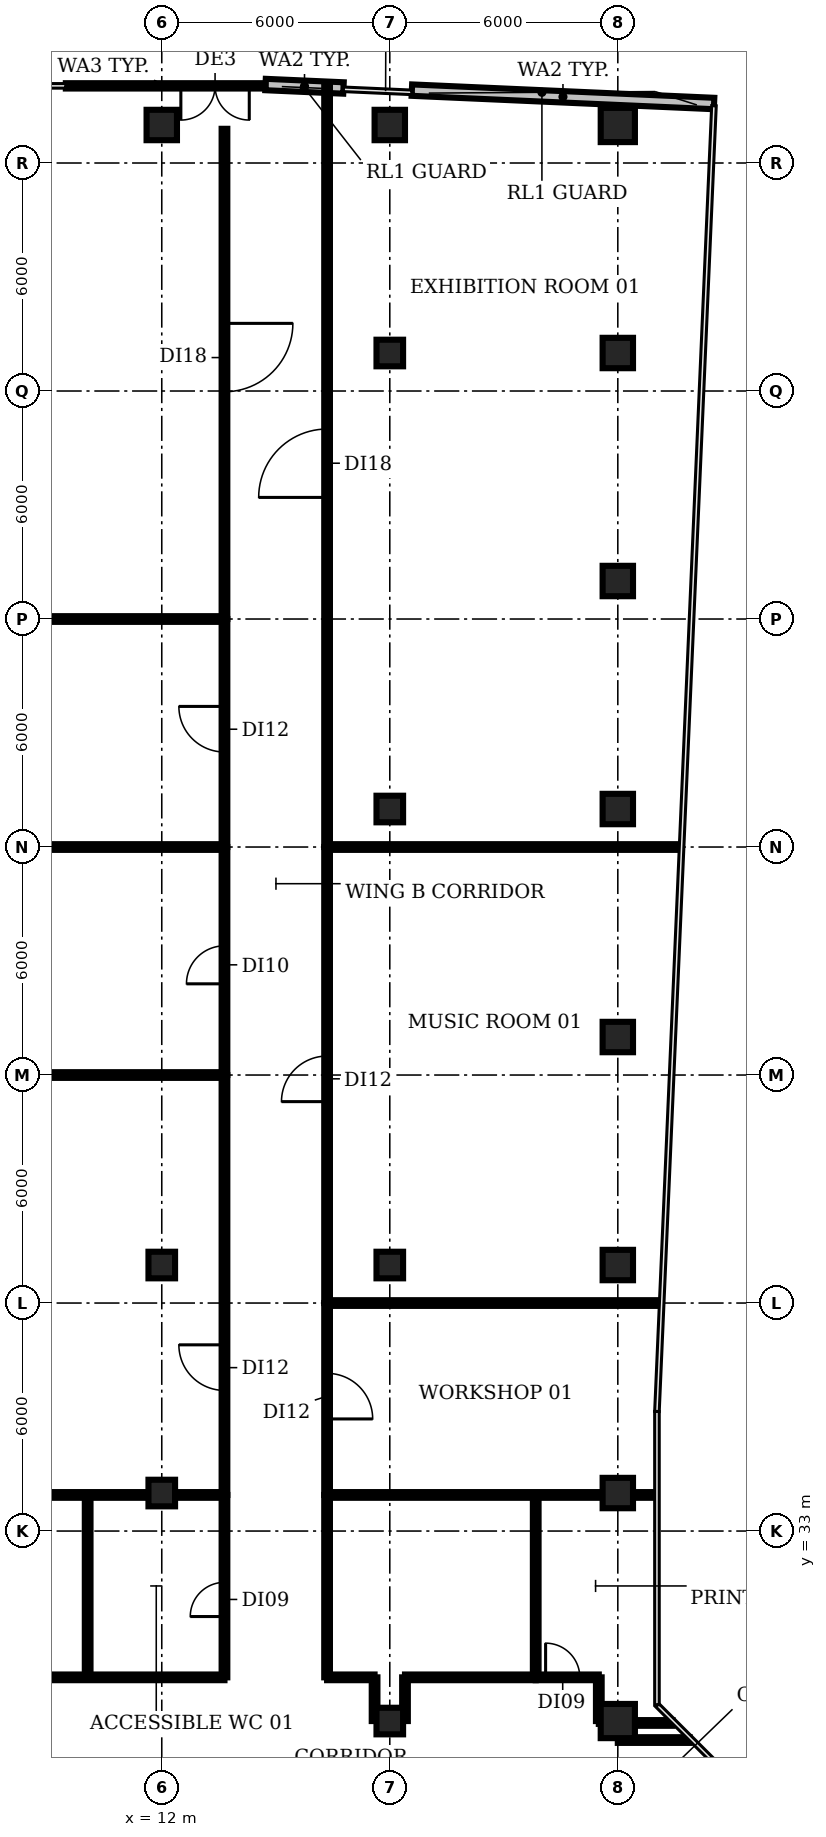
"""IFC4 building model, lengths in metres.
Left out: names, types, materials, properties, quantities, classifications, styles, units other than length and angle.
Written with IfcOpenShell. Run it as: python <this file> out.ifc"""

import sys

from ifc_helpers import new_model, si_unit, direction, frame, frame_2d, origin, origin_2d, place, context, subcontext, project, spatial, rectangle, circle, extrude, element, fill, save


model = new_model("IFC4")
c1 = context("Model", 3, precision=1e-05, world=origin(), true_north=direction((0.0, 1.0)))
c2 = subcontext(c1, "Body", "Model", "MODEL_VIEW")
j1 = project(units=[si_unit("LENGTHUNIT", "METRE"), si_unit("PLANEANGLEUNIT", "RADIAN")], contexts=[c1])
p1 = place(None, origin())
s1 = spatial("IfcSite", under=j1, at=p1, CompositionType="ELEMENT")
p2 = place(p1, origin())
s2 = spatial("IfcBuilding", under=s1, at=p2, CompositionType="ELEMENT")
p3 = place(p2, frame((0.0, 0.0, 239.0)))
s3 = spatial("IfcBuildingStorey", under=s2, at=p3, CompositionType="ELEMENT", Elevation=239.0)
for number, where, z_axis, x_axis in (
    (1, (12.0, 34.0, 0.0), (0.0, 0.0, 1.0), (1.0, 0.0, 0.0)),
    (2, (12.0, 40.0, 0.0), (0.0, 0.0, 1.0), (1.0, 0.0, 0.0)),
):
    element("IfcColumn", number, at=place(p3, frame(where, z_axis=z_axis, x_axis=x_axis)), inside=s3, PredefinedType="COLUMN", context=c2, shape_type="SweptSolid", body=[
        extrude(rectangle(XDim=0.7, YDim=0.7, at=origin_2d()), origin(), (0.0, 0.0, 1.0), 3.85),
    ])
p4 = place(p3, frame((12.0, 70.0, 0.0), z_axis=(0.0, 0.0, 1.0), x_axis=(1.0, 0.0, 0.0)))
e3 = element("IfcColumn", 3, at=p4, inside=s3, PredefinedType="COLUMN", context=c2, shape_type="SweptSolid", body=[
    extrude(rectangle(XDim=0.8, YDim=0.8, at=origin_2d()), origin(), (0.0, 0.0, 1.0), 3.85),
])
for number, where, z_axis, x_axis in (
    (4, (18.0, 28.0, 0.0), (0.0, 0.0, 1.0), (1.0, 0.0, 0.0)),
    (5, (18.0, 40.0, 0.0), (0.0, 0.0, 1.0), (1.0, 0.0, 0.0)),
    (6, (18.0, 52.0, 0.0), (0.0, 0.0, 1.0), (1.0, 0.0, 0.0)),
    (7, (18.0, 64.0, 0.0), (0.0, 0.0, 1.0), (1.0, 0.0, 0.0)),
):
    element("IfcColumn", number, at=place(p3, frame(where, z_axis=z_axis, x_axis=x_axis)), inside=s3, PredefinedType="COLUMN", context=c2, shape_type="SweptSolid", body=[
        extrude(rectangle(XDim=0.7, YDim=0.7, at=origin_2d()), origin(), (0.0, 0.0, 1.0), 3.85),
    ])
p5 = place(p3, frame((18.0, 70.0, 0.0), z_axis=(0.0, 0.0, 1.0), x_axis=(1.0, 0.0, 0.0)))
e8 = element("IfcColumn", 8, at=p5, inside=s3, PredefinedType="COLUMN", context=c2, shape_type="SweptSolid", body=[
    extrude(rectangle(XDim=0.8, YDim=0.8, at=origin_2d()), origin(), (0.0, 0.0, 1.0), 3.85),
])
p6 = place(p3, frame((24.0, 28.0, 0.0), z_axis=(0.0, 0.0, 1.0), x_axis=(1.0, 0.0, 0.0)))
e9 = element("IfcColumn", 9, at=p6, inside=s3, PredefinedType="COLUMN", context=c2, shape_type="SweptSolid", body=[
    extrude(circle(Radius=0.45, at=origin_2d()), origin(), (0.0, 0.0, 1.0), 3.85),
])
for number, where, z_axis, x_axis in (
    (10, (24.0, 34.0, 0.0), (0.0, 0.0, 1.0), (1.0, 0.0, 0.0)),
    (11, (24.0, 40.0, 0.0), (0.0, 0.0, 1.0), (1.0, 0.0, 0.0)),
    (12, (24.0, 46.0, 0.0), (0.0, 0.0, 1.0), (1.0, 0.0, 0.0)),
    (13, (24.0, 52.0, 0.0), (0.0, 0.0, 1.0), (1.0, 0.0, 0.0)),
    (14, (24.0, 58.0, 0.0), (0.0, 0.0, 1.0), (1.0, 0.0, 0.0)),
    (15, (24.0, 64.0, 0.0), (0.0, 0.0, 1.0), (1.0, 0.0, 0.0)),
):
    element("IfcColumn", number, at=place(p3, frame(where, z_axis=z_axis, x_axis=x_axis)), inside=s3, PredefinedType="COLUMN", context=c2, shape_type="SweptSolid", body=[
        extrude(rectangle(XDim=0.8, YDim=0.8, at=origin_2d()), origin(), (0.0, 0.0, 1.0), 3.85),
    ])
p7 = place(p3, frame((24.0, 70.0, 0.0), z_axis=(0.0, 0.0, 1.0), x_axis=(1.0, 0.0, 0.0)))
e16 = element("IfcColumn", 16, at=p7, inside=s3, PredefinedType="COLUMN", context=c2, shape_type="SweptSolid", body=[
    extrude(circle(Radius=0.45, at=origin_2d()), origin(), (0.0, 0.0, 1.0), 3.85),
])
p8 = place(p3, frame((26.533, 70.566, 0.0), z_axis=(0.0, 0.0, 1.0), x_axis=(-0.999020054915, 0.044259799799, 0.0)))
e17 = element("IfcWall", 17, at=p8, inside=s3, PredefinedType="SOLIDWALL", context=c2, shape_type="SweptSolid", body=[
    extrude(rectangle(XDim=7.96, YDim=0.3, at=frame_2d((3.98, 0.0))), origin(), (0.0, 0.0, 1.0), 3.85),
])
p9 = place(p3, frame((16.782, 70.974, 0.0), z_axis=(0.0, 0.0, 1.0), x_axis=(-0.999021293224, 0.044231840167, 0.0)))
e18 = element("IfcWall", 18, at=p9, inside=s3, PredefinedType="SOLIDWALL", context=c2, shape_type="SweptSolid", body=[
    extrude(rectangle(XDim=2.053, YDim=0.3, at=frame_2d((1.027, 0.0))), origin(), (0.0, 0.0, 1.0), 3.85),
])
p10 = place(p3, frame((14.729, 71.03, 0.0), z_axis=(0.0, 0.0, 1.0), x_axis=(-1.0, 0.0, 0.0)))
e19 = element("IfcWall", 19, at=p10, inside=s3, PredefinedType="SOLIDWALL", context=c2, shape_type="SweptSolid", body=[
    extrude(rectangle(XDim=5.253, YDim=0.14, at=frame_2d((2.626, 0.0))), origin(), (0.0, 0.0, 1.0), 3.85),
])
p11 = place(p10, frame((0.427, 0.0, 0.0)))
e20 = element("IfcOpeningElement", 20, at=p11, cuts=e19, PredefinedType="OPENING", context=c2, shape_type="SweptSolid", body=[
    extrude(rectangle(XDim=1.8, YDim=2.4, at=frame_2d((0.9, 1.2))), frame((0.0, 0.08, 0.0), z_axis=(0.0, -1.0, 0.0), x_axis=(1.0, 0.0, 0.0)), (0.0, 0.0, 1.0), 0.16),
])
p12 = place(p3, frame((-1.1, 33.95, 0.0), z_axis=(0.0, 0.0, 1.0), x_axis=(1.0, 0.0, 0.0)))
e21 = element("IfcWall", 21, at=p12, inside=s3, PredefinedType="PARTITIONING", context=c2, shape_type="SweptSolid", body=[
    extrude(rectangle(XDim=14.75, YDim=0.15, at=frame_2d((7.375, 0.0))), origin(), (0.0, 0.0, 1.0), 2.88),
])
for number, where, z_axis, x_axis in (
    (22, (-0.98, 45.0, 0.0), (0.0, 0.0, 1.0), (1.0, 0.0, 0.0)),
    (23, (-0.98, 51.0, 0.0), (0.0, 0.0, 1.0), (1.0, 0.0, 0.0)),
    (24, (-0.98, 57.0, 0.0), (0.0, 0.0, 1.0), (1.0, 0.0, 0.0)),
):
    element("IfcWall", number, at=place(p3, frame(where, z_axis=z_axis, x_axis=x_axis)), inside=s3, PredefinedType="PARTITIONING", context=c2, shape_type="SweptSolid", body=[
        extrude(rectangle(XDim=14.63, YDim=0.15, at=frame_2d((7.315, 0.0))), origin(), (0.0, 0.0, 1.0), 2.88),
    ])
p13 = place(p3, frame((6.4, 29.15, 0.0), z_axis=(0.0, 0.0, 1.0), x_axis=(1.0, 0.0, 0.0)))
e25 = element("IfcWall", 25, at=p13, inside=s3, PredefinedType="PARTITIONING", context=c2, shape_type="SweptSolid", body=[
    extrude(rectangle(XDim=7.25, YDim=0.15, at=frame_2d((3.625, 0.0))), origin(), (0.0, 0.0, 1.0), 2.88),
])
p14 = place(p3, frame((10.05, 29.15, 0.0), z_axis=(0.0, 0.0, 1.0), x_axis=(0.0, 1.0, 0.0)))
e26 = element("IfcWall", 26, at=p14, inside=s3, PredefinedType="PARTITIONING", context=c2, shape_type="SweptSolid", body=[
    extrude(rectangle(XDim=4.8, YDim=0.15, at=frame_2d((2.4, 0.0))), origin(), (0.0, 0.0, 1.0), 2.88),
])
p15 = place(p3, frame((13.65, 29.15, 0.0), z_axis=(0.0, 0.0, 1.0), x_axis=(0.0, 1.0, 0.0)))
e27 = element("IfcWall", 27, at=p15, inside=s3, PredefinedType="PARTITIONING", context=c2, shape_type="SweptSolid", body=[
    extrude(rectangle(XDim=4.8, YDim=0.15, at=frame_2d((2.4, 0.0))), origin(), (0.0, 0.0, 1.0), 2.88),
])
p16 = place(p15, frame((1.6, 0.0, 0.0)))
e28 = element("IfcOpeningElement", 28, at=p16, cuts=e27, PredefinedType="OPENING", context=c2, shape_type="SweptSolid", body=[
    extrude(rectangle(XDim=0.9, YDim=2.1, at=frame_2d((0.45, 1.05))), frame((0.0, 0.085, 0.0), z_axis=(0.0, -1.0, 0.0), x_axis=(1.0, 0.0, 0.0)), (0.0, 0.0, 1.0), 0.17),
])
p17 = place(p3, frame((13.65, 33.95, 0.0), z_axis=(0.0, 0.0, 1.0), x_axis=(0.0, 1.0, 0.0)))
e29 = element("IfcWall", 29, at=p17, inside=s3, PredefinedType="PARTITIONING", context=c2, shape_type="SweptSolid", body=[
    extrude(rectangle(XDim=11.05, YDim=0.15, at=frame_2d((5.525, 0.0))), origin(), (0.0, 0.0, 1.0), 2.88),
])
p18 = place(p17, frame((2.75, 0.0, 0.0)))
e30 = element("IfcOpeningElement", 30, at=p18, cuts=e29, PredefinedType="OPENING", context=c2, shape_type="SweptSolid", body=[
    extrude(rectangle(XDim=1.2, YDim=2.1, at=frame_2d((0.6, 1.05))), frame((0.0, 0.085, 0.0), z_axis=(0.0, -1.0, 0.0), x_axis=(1.0, 0.0, 0.0)), (0.0, 0.0, 1.0), 0.17),
])
p19 = place(p3, frame((13.65, 45.0, 0.0), z_axis=(0.0, 0.0, 1.0), x_axis=(0.0, 1.0, 0.0)))
e31 = element("IfcWall", 31, at=p19, inside=s3, PredefinedType="PARTITIONING", context=c2, shape_type="SweptSolid", body=[
    extrude(rectangle(XDim=6.0, YDim=0.15, at=frame_2d((3.0, 0.0))), origin(), (0.0, 0.0, 1.0), 2.88),
])
p20 = place(p19, frame((2.4, 0.0, 0.0)))
e32 = element("IfcOpeningElement", 32, at=p20, cuts=e31, PredefinedType="OPENING", context=c2, shape_type="SweptSolid", body=[
    extrude(rectangle(XDim=1.0, YDim=2.1, at=frame_2d((0.5, 1.05))), frame((0.0, 0.085, 0.0), z_axis=(0.0, -1.0, 0.0), x_axis=(1.0, 0.0, 0.0)), (0.0, 0.0, 1.0), 0.17),
])
p21 = place(p3, frame((13.65, 51.0, 0.0), z_axis=(0.0, 0.0, 1.0), x_axis=(0.0, 1.0, 0.0)))
e33 = element("IfcWall", 33, at=p21, inside=s3, PredefinedType="PARTITIONING", context=c2, shape_type="SweptSolid", body=[
    extrude(rectangle(XDim=6.0, YDim=0.15, at=frame_2d((3.0, 0.0))), origin(), (0.0, 0.0, 1.0), 2.88),
])
p22 = place(p21, frame((2.5, 0.0, 0.0)))
e34 = element("IfcOpeningElement", 34, at=p22, cuts=e33, PredefinedType="OPENING", context=c2, shape_type="SweptSolid", body=[
    extrude(rectangle(XDim=1.2, YDim=2.1, at=frame_2d((0.6, 1.05))), frame((0.0, 0.085, 0.0), z_axis=(0.0, -1.0, 0.0), x_axis=(1.0, 0.0, 0.0)), (0.0, 0.0, 1.0), 0.17),
])
p23 = place(p3, frame((13.65, 69.9, 0.0), z_axis=(0.0, 0.0, 1.0), x_axis=(0.0, -1.0, 0.0)))
e35 = element("IfcWall", 35, at=p23, inside=s3, PredefinedType="PARTITIONING", context=c2, shape_type="SweptSolid", body=[
    extrude(rectangle(XDim=12.9, YDim=0.15, at=frame_2d((6.45, 0.0))), origin(), (0.0, 0.0, 1.0), 2.88),
])
p24 = place(p23, frame((5.12, 0.0, 0.0)))
e36 = element("IfcOpeningElement", 36, at=p24, cuts=e35, PredefinedType="OPENING", context=c2, shape_type="SweptSolid", body=[
    extrude(rectangle(XDim=1.8, YDim=2.1, at=frame_2d((0.9, 1.05))), frame((0.0, 0.085, 0.0), z_axis=(0.0, -1.0, 0.0), x_axis=(1.0, 0.0, 0.0)), (0.0, 0.0, 1.0), 0.17),
])
p25 = place(p3, frame((16.35, 29.15, 0.0), z_axis=(0.0, 0.0, 1.0), x_axis=(0.0, 1.0, 0.0)))
e37 = element("IfcWall", 37, at=p25, inside=s3, PredefinedType="PARTITIONING", context=c2, shape_type="SweptSolid", body=[
    extrude(rectangle(XDim=4.8, YDim=0.15, at=frame_2d((2.4, 0.0))), origin(), (0.0, 0.0, 1.0), 2.88),
])
p26 = place(p3, frame((16.35, 29.15, 0.0), z_axis=(0.0, 0.0, 1.0), x_axis=(1.0, 0.0, 0.0)))
e38 = element("IfcWall", 38, at=p26, inside=s3, PredefinedType="PARTITIONING", context=c2, shape_type="SweptSolid", body=[
    extrude(rectangle(XDim=1.25, YDim=0.15, at=frame_2d((0.625, 0.0))), origin(), (0.0, 0.0, 1.0), 2.88),
])
p27 = place(p3, frame((16.35, 33.95, 0.0), z_axis=(0.0, 0.0, 1.0), x_axis=(1.0, 0.0, 0.0)))
e39 = element("IfcWall", 39, at=p27, inside=s3, PredefinedType="PARTITIONING", context=c2, shape_type="SweptSolid", body=[
    extrude(rectangle(XDim=8.63, YDim=0.15, at=frame_2d((4.315, 0.0))), origin(), (0.0, 0.0, 1.0), 2.88),
])
p28 = place(p3, frame((16.35, 39.0, 0.0), z_axis=(0.0, 0.0, 1.0), x_axis=(0.0, -1.0, 0.0)))
e40 = element("IfcWall", 40, at=p28, inside=s3, PredefinedType="PARTITIONING", context=c2, shape_type="SweptSolid", body=[
    extrude(rectangle(XDim=5.05, YDim=0.15, at=frame_2d((2.525, 0.0))), origin(), (0.0, 0.0, 1.0), 2.88),
])
p29 = place(p28, frame((1.85, 0.0, 0.0)))
e41 = element("IfcOpeningElement", 41, at=p29, cuts=e40, PredefinedType="OPENING", context=c2, shape_type="SweptSolid", body=[
    extrude(rectangle(XDim=1.2, YDim=2.1, at=frame_2d((0.6, 1.05))), frame((0.0, 0.085, 0.0), z_axis=(0.0, -1.0, 0.0), x_axis=(1.0, 0.0, 0.0)), (0.0, 0.0, 1.0), 0.17),
])
p30 = place(p3, frame((16.35, 39.0, 0.0), z_axis=(0.0, 0.0, 1.0), x_axis=(0.0, 1.0, 0.0)))
e42 = element("IfcWall", 42, at=p30, inside=s3, PredefinedType="PARTITIONING", context=c2, shape_type="SweptSolid", body=[
    extrude(rectangle(XDim=12.0, YDim=0.15, at=frame_2d((6.0, 0.0))), origin(), (0.0, 0.0, 1.0), 2.88),
])
p31 = place(p30, frame((5.3, 0.0, 0.0)))
e43 = element("IfcOpeningElement", 43, at=p31, cuts=e42, PredefinedType="OPENING", context=c2, shape_type="SweptSolid", body=[
    extrude(rectangle(XDim=1.2, YDim=2.1, at=frame_2d((0.6, 1.05))), frame((0.0, 0.085, 0.0), z_axis=(0.0, -1.0, 0.0), x_axis=(1.0, 0.0, 0.0)), (0.0, 0.0, 1.0), 0.17),
])
p32 = place(p3, frame((16.35, 39.0, 0.0), z_axis=(0.0, 0.0, 1.0), x_axis=(1.0, 0.0, 0.0)))
e44 = element("IfcWall", 44, at=p32, inside=s3, PredefinedType="PARTITIONING", context=c2, shape_type="SweptSolid", body=[
    extrude(rectangle(XDim=8.75, YDim=0.15, at=frame_2d((4.375, 0.0))), origin(), (0.0, 0.0, 1.0), 2.88),
])
p33 = place(p3, frame((16.35, 51.0, 0.0), z_axis=(0.0, 0.0, 1.0), x_axis=(0.0, 1.0, 0.0)))
e45 = element("IfcWall", 45, at=p33, inside=s3, PredefinedType="PARTITIONING", context=c2, shape_type="SweptSolid", body=[
    extrude(rectangle(XDim=20.018, YDim=0.15, at=frame_2d((10.009, 0.0))), origin(), (0.0, 0.0, 1.0), 2.88),
])
p34 = place(p33, frame((9.2, 0.0, 0.0)))
e46 = element("IfcOpeningElement", 46, at=p34, cuts=e45, PredefinedType="OPENING", context=c2, shape_type="SweptSolid", body=[
    extrude(rectangle(XDim=1.8, YDim=2.1, at=frame_2d((0.9, 1.05))), frame((0.0, 0.085, 0.0), z_axis=(0.0, -1.0, 0.0), x_axis=(1.0, 0.0, 0.0)), (0.0, 0.0, 1.0), 0.17),
])
p35 = place(p3, frame((16.35, 51.0, 0.0), z_axis=(0.0, 0.0, 1.0), x_axis=(1.0, 0.0, 0.0)))
e47 = element("IfcWall", 47, at=p35, inside=s3, PredefinedType="PARTITIONING", context=c2, shape_type="SweptSolid", body=[
    extrude(rectangle(XDim=9.28, YDim=0.15, at=frame_2d((4.64, 0.0))), origin(), (0.0, 0.0, 1.0), 2.88),
])
for number, where, z_axis, x_axis in (
    (48, (17.6, 28.0, 0.0), (0.0, 0.0, 1.0), (0.0, 1.0, 0.0)),
    (49, (18.4, 28.0, 0.0), (0.0, 0.0, 1.0), (0.0, 1.0, 0.0)),
):
    element("IfcWall", number, at=place(p3, frame(where, z_axis=z_axis, x_axis=x_axis)), inside=s3, PredefinedType="PARTITIONING", context=c2, shape_type="SweptSolid", body=[
        extrude(rectangle(XDim=1.15, YDim=0.15, at=frame_2d((0.575, 0.0))), origin(), (0.0, 0.0, 1.0), 2.88),
    ])
p36 = place(p3, frame((18.4, 29.15, 0.0), z_axis=(0.0, 0.0, 1.0), x_axis=(1.0, 0.0, 0.0)))
e50 = element("IfcWall", 50, at=p36, inside=s3, PredefinedType="PARTITIONING", context=c2, shape_type="SweptSolid", body=[
    extrude(rectangle(XDim=3.44, YDim=0.15, at=frame_2d((1.72, 0.0))), origin(), (0.0, 0.0, 1.0), 2.88),
])
p37 = place(p3, frame((21.84, 29.15, 0.0), z_axis=(0.0, 0.0, 1.0), x_axis=(0.0, 1.0, 0.0)))
e51 = element("IfcWall", 51, at=p37, inside=s3, PredefinedType="PARTITIONING", context=c2, shape_type="SweptSolid", body=[
    extrude(rectangle(XDim=4.8, YDim=0.15, at=frame_2d((2.4, 0.0))), origin(), (0.0, 0.0, 1.0), 2.88),
])
p38 = place(p3, frame((21.84, 29.15, 0.0), z_axis=(0.0, 0.0, 1.0), x_axis=(1.0, 0.0, 0.0)))
e52 = element("IfcWall", 52, at=p38, inside=s3, PredefinedType="PARTITIONING", context=c2, shape_type="SweptSolid", body=[
    extrude(rectangle(XDim=1.66, YDim=0.15, at=frame_2d((0.83, 0.0))), origin(), (0.0, 0.0, 1.0), 2.88),
])
p39 = place(p38, frame((0.26, 0.0, 0.0)))
e53 = element("IfcOpeningElement", 53, at=p39, cuts=e52, PredefinedType="OPENING", context=c2, shape_type="SweptSolid", body=[
    extrude(rectangle(XDim=0.9, YDim=2.1, at=frame_2d((0.45, 1.05))), frame((0.0, 0.085, 0.0), z_axis=(0.0, -1.0, 0.0), x_axis=(1.0, 0.0, 0.0)), (0.0, 0.0, 1.0), 0.17),
])
p40 = place(p3, frame((23.5, 28.0, 0.0), z_axis=(0.0, 0.0, 1.0), x_axis=(0.0, 1.0, 0.0)))
e54 = element("IfcWall", 54, at=p40, inside=s3, PredefinedType="PARTITIONING", context=c2, shape_type="SweptSolid", body=[
    extrude(rectangle(XDim=1.15, YDim=0.15, at=frame_2d((0.575, 0.0))), origin(), (0.0, 0.0, 1.0), 2.88),
])
p41 = place(p3, frame((23.5, 28.0, 0.0), z_axis=(0.0, 0.0, 1.0), x_axis=(1.0, 0.0, 0.0)))
e55 = element("IfcWall", 55, at=p41, inside=s3, PredefinedType="PARTITIONING", context=c2, shape_type="SweptSolid", body=[
    extrude(rectangle(XDim=0.5, YDim=0.15, at=frame_2d((0.25, 0.0))), origin(), (0.0, 0.0, 1.0), 2.88),
])
p42 = place(p3, frame((24.0, 27.5, 0.0), z_axis=(0.0, 0.0, 1.0), x_axis=(1.0, 0.0, 0.0)))
e56 = element("IfcWall", 56, at=p42, inside=s3, PredefinedType="PARTITIONING", context=c2, shape_type="SweptSolid", body=[
    extrude(rectangle(XDim=1.89, YDim=0.15, at=frame_2d((0.945, 0.0))), origin(), (0.0, 0.0, 1.0), 2.88),
])
p43 = place(p3, frame((24.0, 27.95, 0.0), z_axis=(0.0, 0.0, 1.0), x_axis=(1.0, 0.0, 0.0)))
e57 = element("IfcWall", 57, at=p43, inside=s3, PredefinedType="PARTITIONING", context=c2, shape_type="SweptSolid", body=[
    extrude(rectangle(XDim=1.44, YDim=0.15, at=frame_2d((0.72, 0.0))), origin(), (0.0, 0.0, 1.0), 2.88),
])
p44 = place(p11, origin())
e58 = element("IfcDoor", 58, at=p44, inside=s3, OperationType="DOUBLE_DOOR_DOUBLE_SWING", PredefinedType="DOOR", context=c2, shape_type="SweptSolid", body=[
    extrude(rectangle(XDim=1.8, YDim=2.4, at=frame_2d((0.9, 1.2))), frame((0.0, 0.025, 0.0), z_axis=(0.0, -1.0, 0.0), x_axis=(1.0, 0.0, 0.0)), (0.0, 0.0, 1.0), 0.05),
])
fill(e20, e58)
p45 = place(p16, origin())
e59 = element("IfcDoor", 59, at=p45, inside=s3, OperationType="SINGLE_SWING_LEFT", PredefinedType="DOOR", context=c2, shape_type="SweptSolid", body=[
    extrude(rectangle(XDim=0.9, YDim=2.1, at=frame_2d((0.45, 1.05))), frame((0.0, 0.025, 0.0), z_axis=(0.0, -1.0, 0.0), x_axis=(1.0, 0.0, 0.0)), (0.0, 0.0, 1.0), 0.05),
])
fill(e28, e59)
p46 = place(p18, origin())
e60 = element("IfcDoor", 60, at=p46, inside=s3, OperationType="SINGLE_SWING_RIGHT", PredefinedType="DOOR", context=c2, shape_type="SweptSolid", body=[
    extrude(rectangle(XDim=1.2, YDim=2.1, at=frame_2d((0.6, 1.05))), frame((0.0, 0.025, 0.0), z_axis=(0.0, -1.0, 0.0), x_axis=(1.0, 0.0, 0.0)), (0.0, 0.0, 1.0), 0.05),
])
fill(e30, e60)
p47 = place(p20, origin())
e61 = element("IfcDoor", 61, at=p47, inside=s3, OperationType="SINGLE_SWING_LEFT", PredefinedType="DOOR", context=c2, shape_type="SweptSolid", body=[
    extrude(rectangle(XDim=1.0, YDim=2.1, at=frame_2d((0.5, 1.05))), frame((0.0, 0.025, 0.0), z_axis=(0.0, -1.0, 0.0), x_axis=(1.0, 0.0, 0.0)), (0.0, 0.0, 1.0), 0.05),
])
fill(e32, e61)
p48 = place(p22, origin())
e62 = element("IfcDoor", 62, at=p48, inside=s3, OperationType="SINGLE_SWING_RIGHT", PredefinedType="DOOR", context=c2, shape_type="SweptSolid", body=[
    extrude(rectangle(XDim=1.2, YDim=2.1, at=frame_2d((0.6, 1.05))), frame((0.0, 0.025, 0.0), z_axis=(0.0, -1.0, 0.0), x_axis=(1.0, 0.0, 0.0)), (0.0, 0.0, 1.0), 0.05),
])
fill(e34, e62)
p49 = place(p24, origin())
e63 = element("IfcDoor", 63, at=p49, inside=s3, OperationType="SINGLE_SWING_LEFT", PredefinedType="DOOR", context=c2, shape_type="SweptSolid", body=[
    extrude(rectangle(XDim=1.8, YDim=2.1, at=frame_2d((0.9, 1.05))), frame((0.0, 0.025, 0.0), z_axis=(0.0, -1.0, 0.0), x_axis=(1.0, 0.0, 0.0)), (0.0, 0.0, 1.0), 0.05),
])
fill(e36, e63)
p50 = place(p29, origin())
e64 = element("IfcDoor", 64, at=p50, inside=s3, OperationType="SINGLE_SWING_RIGHT", PredefinedType="DOOR", context=c2, shape_type="SweptSolid", body=[
    extrude(rectangle(XDim=1.2, YDim=2.1, at=frame_2d((0.6, 1.05))), frame((0.0, 0.025, 0.0), z_axis=(0.0, -1.0, 0.0), x_axis=(1.0, 0.0, 0.0)), (0.0, 0.0, 1.0), 0.05),
])
fill(e41, e64)
p51 = place(p31, origin())
e65 = element("IfcDoor", 65, at=p51, inside=s3, OperationType="SINGLE_SWING_LEFT", PredefinedType="DOOR", context=c2, shape_type="SweptSolid", body=[
    extrude(rectangle(XDim=1.2, YDim=2.1, at=frame_2d((0.6, 1.05))), frame((0.0, 0.025, 0.0), z_axis=(0.0, -1.0, 0.0), x_axis=(1.0, 0.0, 0.0)), (0.0, 0.0, 1.0), 0.05),
])
fill(e43, e65)
p52 = place(p34, origin())
e66 = element("IfcDoor", 66, at=p52, inside=s3, OperationType="SINGLE_SWING_LEFT", PredefinedType="DOOR", context=c2, shape_type="SweptSolid", body=[
    extrude(rectangle(XDim=1.8, YDim=2.1, at=frame_2d((0.9, 1.05))), frame((0.0, 0.025, 0.0), z_axis=(0.0, -1.0, 0.0), x_axis=(1.0, 0.0, 0.0)), (0.0, 0.0, 1.0), 0.05),
])
fill(e46, e66)
p53 = place(p39, origin())
e67 = element("IfcDoor", 67, at=p53, inside=s3, OperationType="SINGLE_SWING_LEFT", PredefinedType="DOOR", context=c2, shape_type="SweptSolid", body=[
    extrude(rectangle(XDim=0.9, YDim=2.1, at=frame_2d((0.45, 1.05))), frame((0.0, 0.025, 0.0), z_axis=(0.0, -1.0, 0.0), x_axis=(1.0, 0.0, 0.0)), (0.0, 0.0, 1.0), 0.05),
])
fill(e53, e67)
save(model, sys.argv[1])
